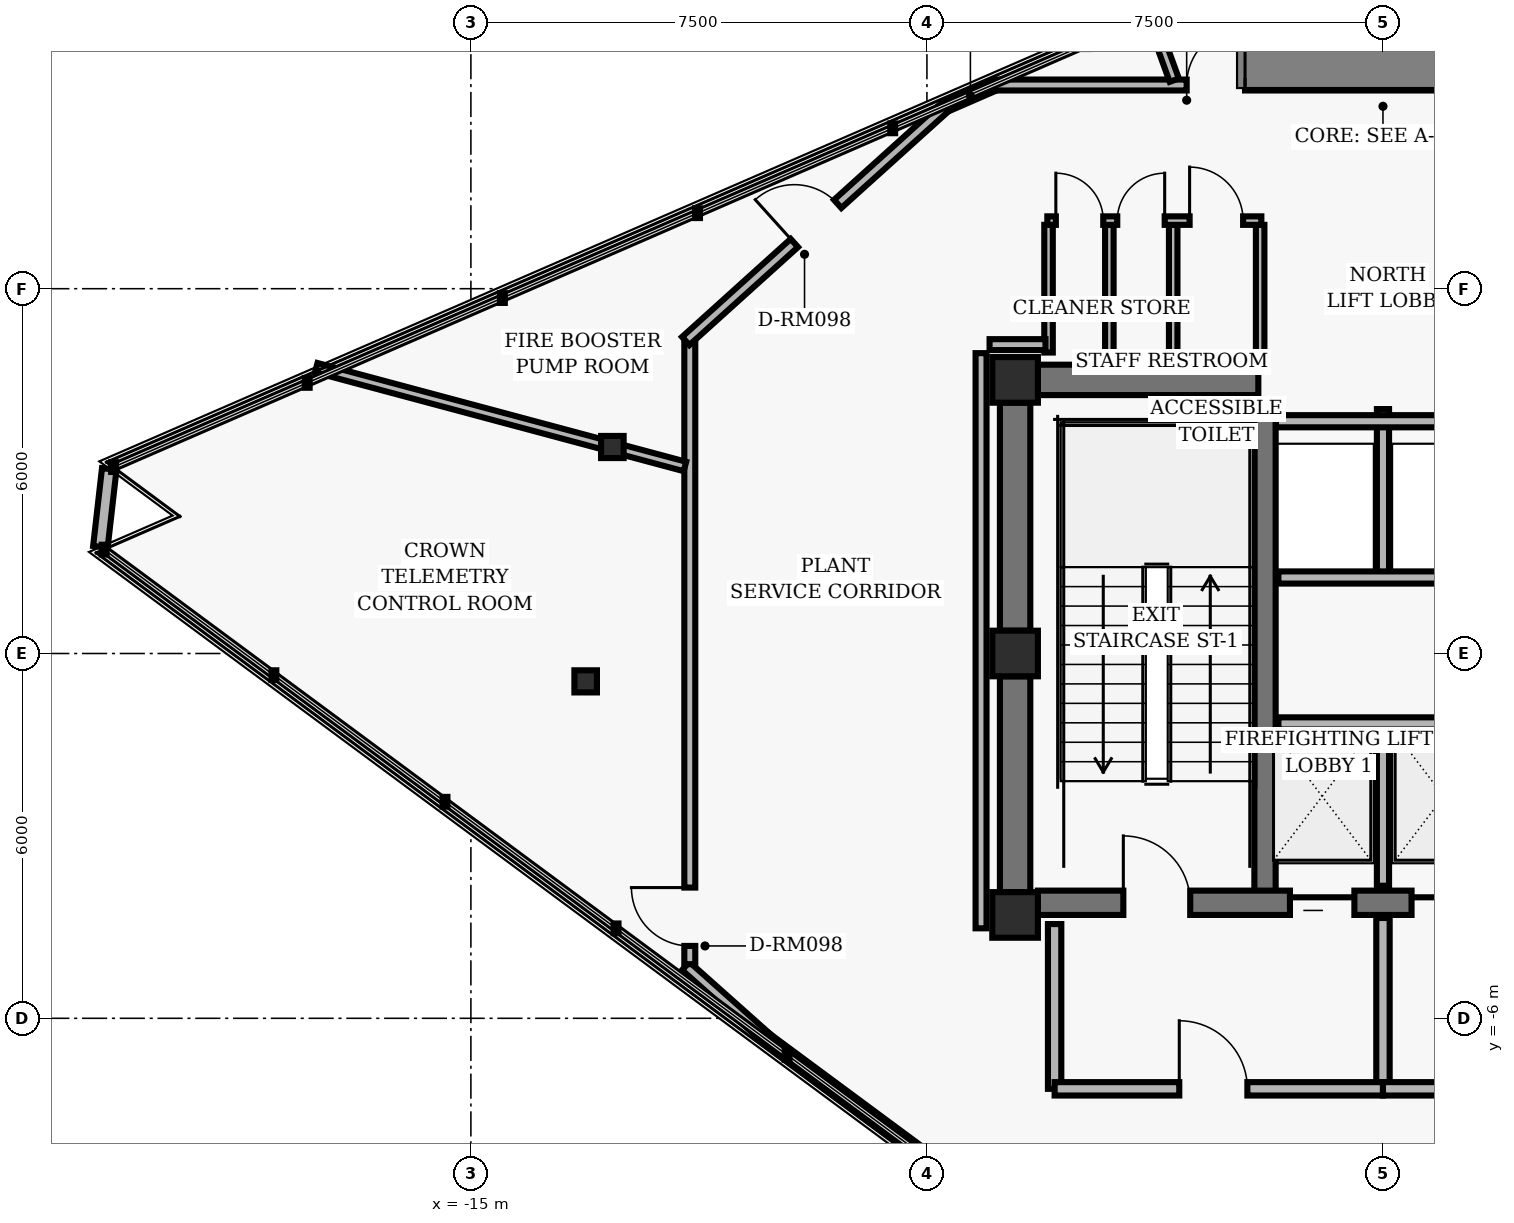
"""IFC4 building model, lengths in metres.
Left out: names, types, materials, properties, quantities, classifications, styles, units other than length and angle.
Written with IfcOpenShell. Run it as: python <this file> out.ifc"""

import sys

from ifc_helpers import new_model, si_unit, direction, frame, frame_2d, origin, origin_2d, place, context, subcontext, project, spatial, rectangle, hollow_rectangle, i_section, extrude, element, fill, save


model = new_model("IFC4")
c1 = context("Model", 3, precision=1e-05, world=origin(), true_north=direction((0.0, 1.0)))
c2 = subcontext(c1, "Body", "Model", "MODEL_VIEW")
j1 = project(units=[si_unit("LENGTHUNIT", "METRE"), si_unit("PLANEANGLEUNIT", "RADIAN")], contexts=[c1])
p1 = place(None, origin())
s1 = spatial("IfcSite", under=j1, at=p1, CompositionType="ELEMENT")
p2 = place(p1, origin())
s2 = spatial("IfcBuilding", under=s1, at=p2, CompositionType="ELEMENT")
p3 = place(p2, frame((0.0, 0.0, 239.2)))
s3 = spatial("IfcBuildingStorey", under=s2, at=p3, CompositionType="ELEMENT", Elevation=239.2)
for number, where, z_axis, x_axis in (
    (1, (-6.05, 4.5, 0.0), (0.0, 0.0, 1.0), (1.0, 0.0, 0.0)),
    (2, (-6.05, 0.0, 0.0), (0.0, 0.0, 1.0), (1.0, 0.0, 0.0)),
    (3, (-6.05, -4.3, 0.0), (0.0, 0.0, 1.0), (1.0, 0.0, 0.0)),
):
    element("IfcColumn", number, at=place(p3, frame(where, z_axis=z_axis, x_axis=x_axis)), inside=s3, PredefinedType="COLUMN", context=c2, shape_type="SweptSolid", body=[
        extrude(hollow_rectangle(XDim=0.75, YDim=0.75, WallThickness=0.05, InnerFilletRadius=0.02, OuterFilletRadius=0.04, at=origin_2d()), origin(), (0.0, 0.0, 1.0), 4.16),
    ])
p4 = place(p3, frame((-6.05, 0.375, 0.0), z_axis=(0.0, 0.0, 1.0), x_axis=(0.0, 1.0, 0.0)))
e4 = element("IfcWall", 4, at=p4, inside=s3, PredefinedType="SHEAR", context=c2, shape_type="SweptSolid", body=[
    extrude(rectangle(XDim=3.75, YDim=0.5, at=frame_2d((1.875, 0.0))), origin(), (0.0, 0.0, 1.0), 3.928),
])
p5 = place(p3, frame((-6.05, -3.925, 0.0), z_axis=(0.0, 0.0, 1.0), x_axis=(0.0, 1.0, 0.0)))
e5 = element("IfcWall", 5, at=p5, inside=s3, PredefinedType="SHEAR", context=c2, shape_type="SweptSolid", body=[
    extrude(rectangle(XDim=3.55, YDim=0.5, at=frame_2d((1.775, 0.0))), origin(), (0.0, 0.0, 1.0), 3.928),
])
p6 = place(p3, frame((-1.94, -4.1, 0.0), z_axis=(0.0, 0.0, 1.0), x_axis=(0.0, 1.0, 0.0)))
e6 = element("IfcWall", 6, at=p6, inside=s3, PredefinedType="SHEAR", context=c2, shape_type="SweptSolid", body=[
    extrude(rectangle(XDim=8.2, YDim=0.35, at=frame_2d((4.1, 0.0))), origin(), (0.0, 0.0, 1.0), 3.928),
])
p7 = place(p3, frame((-5.675, -4.1, 0.0), z_axis=(0.0, 0.0, 1.0), x_axis=(1.0, 0.0, 0.0)))
e7 = element("IfcWall", 7, at=p7, inside=s3, PredefinedType="SHEAR", context=c2, shape_type="SweptSolid", body=[
    extrude(rectangle(XDim=11.35, YDim=0.4, at=frame_2d((5.675, 0.0))), origin(), (0.0, 0.0, 1.0), 3.928),
])
p8 = place(p7, frame((1.405, 0.0, 0.0)))
e8 = element("IfcOpeningElement", 8, at=p8, cuts=e7, PredefinedType="OPENING", context=c2, shape_type="SweptSolid", body=[
    extrude(rectangle(XDim=1.1, YDim=2.04, at=frame_2d((0.55, 1.02))), frame((0.0, 0.21, 0.0), z_axis=(0.0, -1.0, 0.0), x_axis=(1.0, 0.0, 0.0)), (0.0, 0.0, 1.0), 0.42),
])
p9 = place(p7, frame((8.845, 0.0, 0.0)))
e9 = element("IfcOpeningElement", 9, at=p9, cuts=e7, PredefinedType="OPENING", context=c2, shape_type="SweptSolid", body=[
    extrude(rectangle(XDim=1.1, YDim=2.04, at=frame_2d((0.55, 1.02))), frame((0.0, 0.21, 0.0), z_axis=(0.0, -1.0, 0.0), x_axis=(1.0, 0.0, 0.0)), (0.0, 0.0, 1.0), 0.42),
])
p10 = place(p7, frame((4.145, 0.0, 0.0)))
e10 = element("IfcOpeningElement", 10, at=p10, cuts=e7, PredefinedType="OPENING", context=c2, shape_type="SweptSolid", body=[
    extrude(rectangle(XDim=1.06, YDim=2.04, at=frame_2d((0.53, 1.02))), frame((0.0, 0.21, 0.0), z_axis=(0.0, -1.0, 0.0), x_axis=(1.0, 0.0, 0.0)), (0.0, 0.0, 1.0), 0.42),
])
p11 = place(p7, frame((6.145, 0.0, 0.0)))
e11 = element("IfcOpeningElement", 11, at=p11, cuts=e7, PredefinedType="OPENING", context=c2, shape_type="SweptSolid", body=[
    extrude(rectangle(XDim=1.06, YDim=2.04, at=frame_2d((0.53, 1.02))), frame((0.0, 0.21, 0.0), z_axis=(0.0, -1.0, 0.0), x_axis=(1.0, 0.0, 0.0)), (0.0, 0.0, 1.0), 0.42),
])
p12 = place(p3, frame((-5.675, 4.5, 0.0), z_axis=(0.0, 0.0, 1.0), x_axis=(1.0, 0.0, 0.0)))
e12 = element("IfcWall", 12, at=p12, inside=s3, PredefinedType="SHEAR", context=c2, shape_type="SweptSolid", body=[
    extrude(rectangle(XDim=3.625, YDim=0.5, at=frame_2d((1.812, 0.0))), origin(), (0.0, 0.0, 1.0), 3.928),
])
for number, where, z_axis, x_axis in (
    (13, (-12.673, 3.396, 0.0), (0.0, 0.0, 1.0), (1.0, 0.0, 0.0)),
    (14, (-13.113, -0.458, 0.0), (0.0, 0.0, 1.0), (1.0, 0.0, 0.0)),
):
    element("IfcColumn", number, at=place(p3, frame(where, z_axis=z_axis, x_axis=x_axis)), inside=s3, PredefinedType="COLUMN", context=c2, shape_type="SweptSolid", body=[
        extrude(i_section(OverallWidth=0.371, OverallDepth=0.364, WebThickness=0.013, FlangeThickness=0.022, FilletRadius=0.015, at=origin_2d()), origin(), (0.0, 0.0, 1.0), 4.16),
    ])
p13 = place(p3, frame((-20.948, 3.035, 0.0), z_axis=(0.0, 0.0, 1.0), x_axis=(-0.113322117878, -0.993558301057, 0.0)))
e15 = element("IfcWall", 15, at=p13, inside=s3, PredefinedType="PARAPET", context=c2, shape_type="SweptSolid", body=[
    extrude(rectangle(XDim=1.288, YDim=0.24, at=frame_2d((0.644, 0.0))), origin(), (0.0, 0.0, 1.0), 3.448),
])
p14 = place(p3, frame((0.0, -3.82, 0.0), z_axis=(0.0, 0.0, 1.0), x_axis=(0.0, 1.0, 0.0)))
e16 = element("IfcWall", 16, at=p14, inside=s3, PredefinedType="PARTITIONING", context=c2, shape_type="SweptSolid", body=[
    extrude(rectangle(XDim=2.67, YDim=0.2, at=frame_2d((1.335, 0.0))), origin(), (0.0, 0.0, 1.0), 3.903),
])
p15 = place(p3, frame((-1.72, -1.15, 0.0), z_axis=(0.0, 0.0, 1.0), x_axis=(1.0, 0.0, 0.0)))
e17 = element("IfcWall", 17, at=p15, inside=s3, PredefinedType="PARTITIONING", context=c2, shape_type="SweptSolid", body=[
    extrude(rectangle(XDim=3.44, YDim=0.2, at=frame_2d((1.72, 0.0))), origin(), (0.0, 0.0, 1.0), 3.903),
])
p16 = place(p3, frame((-5.4, -7.16, 0.0), z_axis=(0.0, 0.0, 1.0), x_axis=(0.0, 1.0, 0.0)))
e18 = element("IfcWall", 18, at=p16, inside=s3, PredefinedType="PARTITIONING", context=c2, shape_type="SweptSolid", body=[
    extrude(rectangle(XDim=2.71, YDim=0.22, at=frame_2d((1.355, 0.0))), origin(), (0.0, 0.0, 1.0), 3.903),
])
p17 = place(p3, frame((0.0, -7.16, 0.0), z_axis=(0.0, 0.0, 1.0), x_axis=(0.0, 1.0, 0.0)))
e19 = element("IfcWall", 19, at=p17, inside=s3, PredefinedType="PARTITIONING", context=c2, shape_type="SweptSolid", body=[
    extrude(rectangle(XDim=2.81, YDim=0.22, at=frame_2d((1.405, 0.0))), origin(), (0.0, 0.0, 1.0), 3.903),
])
p18 = place(p3, frame((-5.4, -7.16, 0.0), z_axis=(0.0, 0.0, 1.0), x_axis=(1.0, 0.0, 0.0)))
e20 = element("IfcWall", 20, at=p18, inside=s3, PredefinedType="PARTITIONING", context=c2, shape_type="SweptSolid", body=[
    extrude(rectangle(XDim=5.4, YDim=0.22, at=frame_2d((2.7, 0.0))), origin(), (0.0, 0.0, 1.0), 3.903),
])
p19 = place(p18, frame((2.05, 0.0, 0.0)))
e21 = element("IfcOpeningElement", 21, at=p19, cuts=e20, PredefinedType="OPENING", context=c2, shape_type="SweptSolid", body=[
    extrude(rectangle(XDim=1.12, YDim=2.02, at=frame_2d((0.56, 1.01))), frame((0.0, 0.12, 0.0), z_axis=(0.0, -1.0, 0.0), x_axis=(1.0, 0.0, 0.0)), (0.0, 0.0, 1.0), 0.24),
])
p20 = place(p3, frame((0.0, -7.16, 0.0), z_axis=(0.0, 0.0, 1.0), x_axis=(1.0, 0.0, 0.0)))
e22 = element("IfcWall", 22, at=p20, inside=s3, PredefinedType="PARTITIONING", context=c2, shape_type="SweptSolid", body=[
    extrude(rectangle(XDim=5.4, YDim=0.22, at=frame_2d((2.7, 0.0))), origin(), (0.0, 0.0, 1.0), 3.903),
])
p21 = place(p20, frame((2.05, 0.0, 0.0)))
e23 = element("IfcOpeningElement", 23, at=p21, cuts=e22, PredefinedType="OPENING", context=c2, shape_type="SweptSolid", body=[
    extrude(rectangle(XDim=1.12, YDim=2.02, at=frame_2d((0.56, 1.01))), frame((0.0, 0.12, 0.0), z_axis=(0.0, -1.0, 0.0), x_axis=(1.0, 0.0, 0.0)), (0.0, 0.0, 1.0), 0.24),
])
p22 = place(p3, frame((0.0, 1.25, 0.0), z_axis=(0.0, 0.0, 1.0), x_axis=(0.0, 1.0, 0.0)))
e24 = element("IfcWall", 24, at=p22, inside=s3, PredefinedType="PARTITIONING", context=c2, shape_type="SweptSolid", body=[
    extrude(rectangle(XDim=2.77, YDim=0.2, at=frame_2d((1.385, 0.0))), origin(), (0.0, 0.0, 1.0), 3.903),
])
p23 = place(p3, frame((-1.72, 1.25, 0.0), z_axis=(0.0, 0.0, 1.0), x_axis=(1.0, 0.0, 0.0)))
e25 = element("IfcWall", 25, at=p23, inside=s3, PredefinedType="PARTITIONING", context=c2, shape_type="SweptSolid", body=[
    extrude(rectangle(XDim=3.44, YDim=0.2, at=frame_2d((1.72, 0.0))), origin(), (0.0, 0.0, 1.0), 3.903),
])
p24 = place(p3, frame((-1.76, 3.82, 0.0), z_axis=(0.0, 0.0, 1.0), x_axis=(1.0, 0.0, 0.0)))
e26 = element("IfcWall", 26, at=p24, inside=s3, PredefinedType="PARTITIONING", context=c2, shape_type="SweptSolid", body=[
    extrude(rectangle(XDim=3.52, YDim=0.2, at=frame_2d((1.76, 0.0))), origin(), (0.0, 0.0, 1.0), 3.903),
])
for number, where, z_axis, x_axis in (
    (27, (-5.5, 4.95, 0.0), (0.0, 0.0, 1.0), (0.0, 1.0, 0.0)),
    (28, (-4.5, 4.95, 0.0), (0.0, 0.0, 1.0), (0.0, 1.0, 0.0)),
    (29, (-3.45, 4.95, 0.0), (0.0, 0.0, 1.0), (0.0, 1.0, 0.0)),
    (30, (-2.02, 4.95, 0.0), (0.0, 0.0, 1.0), (0.0, 1.0, 0.0)),
):
    element("IfcWall", number, at=place(p3, frame(where, z_axis=z_axis, x_axis=x_axis)), inside=s3, PredefinedType="PARTITIONING", context=c2, shape_type="SweptSolid", body=[
        extrude(rectangle(XDim=2.1, YDim=0.14, at=frame_2d((1.05, 0.0))), origin(), (0.0, 0.0, 1.0), 3.903),
    ])
p25 = place(p3, frame((-5.52, 7.12, 0.0), z_axis=(0.0, 0.0, 1.0), x_axis=(1.0, 0.0, 0.0)))
e31 = element("IfcWall", 31, at=p25, inside=s3, PredefinedType="PARTITIONING", context=c2, shape_type="SweptSolid", body=[
    extrude(rectangle(XDim=3.52, YDim=0.14, at=frame_2d((1.76, 0.0))), origin(), (0.0, 0.0, 1.0), 3.903),
])
p26 = place(p25, frame((0.14, 0.0, 0.0)))
e32 = element("IfcOpeningElement", 32, at=p26, cuts=e31, PredefinedType="OPENING", context=c2, shape_type="SweptSolid", body=[
    extrude(rectangle(XDim=0.78, YDim=2.01, at=frame_2d((0.39, 1.005))), frame((0.0, 0.08, 0.0), z_axis=(0.0, -1.0, 0.0), x_axis=(1.0, 0.0, 0.0)), (0.0, 0.0, 1.0), 0.16),
])
p27 = place(p25, frame((1.15, 0.0, 0.0)))
e33 = element("IfcOpeningElement", 33, at=p27, cuts=e31, PredefinedType="OPENING", context=c2, shape_type="SweptSolid", body=[
    extrude(rectangle(XDim=0.78, YDim=2.01, at=frame_2d((0.39, 1.005))), frame((0.0, 0.08, 0.0), z_axis=(0.0, -1.0, 0.0), x_axis=(1.0, 0.0, 0.0)), (0.0, 0.0, 1.0), 0.16),
])
p28 = place(p25, frame((2.34, 0.0, 0.0)))
e34 = element("IfcOpeningElement", 34, at=p28, cuts=e31, PredefinedType="OPENING", context=c2, shape_type="SweptSolid", body=[
    extrude(rectangle(XDim=0.88, YDim=2.02, at=frame_2d((0.44, 1.01))), frame((0.0, 0.08, 0.0), z_axis=(0.0, -1.0, 0.0), x_axis=(1.0, 0.0, 0.0)), (0.0, 0.0, 1.0), 0.16),
])
p29 = place(p3, frame((-7.215, 8.984, 0.0), z_axis=(0.0, 0.0, 1.0), x_axis=(0.91702860971, 0.398821424917, 0.0)))
e35 = element("IfcWall", 35, at=p29, inside=s3, PredefinedType="PARTITIONING", context=c2, shape_type="SweptSolid", body=[
    extrude(rectangle(XDim=0.937, YDim=0.18, at=frame_2d((0.468, 0.0))), origin(), (0.0, 0.0, 1.0), 3.903),
])
p30 = place(p3, frame((-6.394, 9.35, 0.0), z_axis=(0.0, 0.0, 1.0), x_axis=(1.0, 0.0, 0.0)))
e36 = element("IfcWall", 36, at=p30, inside=s3, PredefinedType="PARTITIONING", context=c2, shape_type="SweptSolid", body=[
    extrude(rectangle(XDim=13.284, YDim=0.18, at=frame_2d((6.642, 0.0))), origin(), (0.0, 0.0, 1.0), 3.903),
])
p31 = place(p30, frame((3.166, 0.0, 0.0)))
e37 = element("IfcOpeningElement", 37, at=p31, cuts=e36, PredefinedType="OPENING", context=c2, shape_type="SweptSolid", body=[
    extrude(rectangle(XDim=0.96, YDim=2.02, at=frame_2d((0.48, 1.01))), frame((0.0, 0.1, 0.0), z_axis=(0.0, -1.0, 0.0), x_axis=(1.0, 0.0, 0.0)), (0.0, 0.0, 1.0), 0.2),
])
p32 = place(p3, frame((-6.192, -9.247, 0.0), z_axis=(0.0, 0.0, 1.0), x_axis=(-0.803841424004, 0.594843647571, 0.0)))
e38 = element("IfcWall", 38, at=p32, inside=s3, PredefinedType="PARTITIONING", context=c2, shape_type="SweptSolid", body=[
    extrude(rectangle(XDim=4.913, YDim=0.18, at=frame_2d((2.457, 0.0))), origin(), (0.0, 0.0, 1.0), 3.903),
])
p33 = place(p3, frame((-10.111, -6.349, 0.0), z_axis=(0.0, 0.0, 1.0), x_axis=(-0.746578549697, 0.665297278765, 0.0)))
e39 = element("IfcWall", 39, at=p33, inside=s3, PredefinedType="PARTITIONING", context=c2, shape_type="SweptSolid", body=[
    extrude(rectangle(XDim=1.817, YDim=0.18, at=frame_2d((0.909, 0.0))), origin(), (0.0, 0.0, 1.0), 3.903),
])
p34 = place(p3, frame((-11.4, -5.11, 0.0), z_axis=(0.0, 0.0, 1.0), x_axis=(0.0, 1.0, 0.0)))
e40 = element("IfcWall", 40, at=p34, inside=s3, PredefinedType="PARTITIONING", context=c2, shape_type="SweptSolid", body=[
    extrude(rectangle(XDim=10.22, YDim=0.18, at=frame_2d((5.11, 0.0))), origin(), (0.0, 0.0, 1.0), 3.903),
])
p35 = place(p34, frame((0.3, 0.0, 0.0)))
e41 = element("IfcOpeningElement", 41, at=p35, cuts=e40, PredefinedType="OPENING", context=c2, shape_type="SweptSolid", body=[
    extrude(rectangle(XDim=0.96, YDim=2.02, at=frame_2d((0.48, 1.01))), frame((0.0, 0.1, 0.0), z_axis=(0.0, -1.0, 0.0), x_axis=(1.0, 0.0, 0.0)), (0.0, 0.0, 1.0), 0.2),
])
p36 = place(p3, frame((-11.467, 5.14, 0.0), z_axis=(0.0, 0.0, 1.0), x_axis=(0.742488041898, 0.66985931929, 0.0)))
e42 = element("IfcWall", 42, at=p36, inside=s3, PredefinedType="PARTITIONING", context=c2, shape_type="SweptSolid", body=[
    extrude(rectangle(XDim=5.772, YDim=0.18, at=frame_2d((2.886, 0.0))), origin(), (0.0, 0.0, 1.0), 3.903),
])
p37 = place(p36, frame((2.406, 0.0, 0.0)))
e43 = element("IfcOpeningElement", 43, at=p37, cuts=e42, PredefinedType="OPENING", context=c2, shape_type="SweptSolid", body=[
    extrude(rectangle(XDim=0.96, YDim=2.02, at=frame_2d((0.48, 1.01))), frame((0.0, 0.1, 0.0), z_axis=(0.0, -1.0, 0.0), x_axis=(1.0, 0.0, 0.0)), (0.0, 0.0, 1.0), 0.2),
])
p38 = place(p3, frame((-6.61, 4.94, 0.0), z_axis=(0.0, 0.0, 1.0), x_axis=(0.0, -1.0, 0.0)))
e44 = element("IfcWall", 44, at=p38, inside=s3, PredefinedType="PARTITIONING", context=c2, shape_type="SweptSolid", body=[
    extrude(rectangle(XDim=9.46, YDim=0.18, at=frame_2d((4.73, 0.0))), origin(), (0.0, 0.0, 1.0), 3.903),
])
p39 = place(p3, frame((-5.55, 5.08, 0.0), z_axis=(0.0, 0.0, 1.0), x_axis=(-1.0, 0.0, 0.0)))
e45 = element("IfcWall", 45, at=p39, inside=s3, PredefinedType="PARTITIONING", context=c2, shape_type="SweptSolid", body=[
    extrude(rectangle(XDim=0.92, YDim=0.18, at=frame_2d((0.46, 0.0))), origin(), (0.0, 0.0, 1.0), 3.903),
])
p40 = place(p3, frame((-3.432, 9.43, 0.0), z_axis=(0.0, 0.0, 1.0), x_axis=(-0.342016142969, 0.939694076787, 0.0)))
e46 = element("IfcWall", 46, at=p40, inside=s3, PredefinedType="PARTITIONING", context=c2, shape_type="SweptSolid", body=[
    extrude(rectangle(XDim=1.292, YDim=0.16, at=frame_2d((0.646, 0.0))), origin(), (0.0, 0.0, 1.0), 3.903),
])
p41 = place(p3, frame((-11.48, 3.076, 0.0), z_axis=(0.0, 0.0, 1.0), x_axis=(-0.965930864757, 0.258800240551, 0.0)))
e47 = element("IfcWall", 47, at=p41, inside=s3, PredefinedType="PARTITIONING", context=c2, shape_type="SweptSolid", body=[
    extrude(rectangle(XDim=6.277, YDim=0.16, at=frame_2d((3.139, 0.0))), origin(), (0.0, 0.0, 1.0), 3.903),
])
p42 = place(p8, origin())
e48 = element("IfcDoor", 48, at=p42, inside=s3, OperationType="SINGLE_SWING_LEFT", PredefinedType="DOOR", context=c2, shape_type="SweptSolid", body=[
    extrude(rectangle(XDim=1.1, YDim=2.04, at=frame_2d((0.55, 1.02))), frame((0.0, 0.025, 0.0), z_axis=(0.0, -1.0, 0.0), x_axis=(1.0, 0.0, 0.0)), (0.0, 0.0, 1.0), 0.05),
])
fill(e8, e48)
p43 = place(p10, origin())
e49 = element("IfcDoor", 49, at=p43, inside=s3, OperationType="SLIDING_TO_LEFT", PredefinedType="DOOR", context=c2, shape_type="SweptSolid", body=[
    extrude(rectangle(XDim=1.06, YDim=2.04, at=frame_2d((0.53, 1.02))), frame((0.0, 0.025, 0.0), z_axis=(0.0, -1.0, 0.0), x_axis=(1.0, 0.0, 0.0)), (0.0, 0.0, 1.0), 0.05),
])
fill(e10, e49)
p44 = place(p11, origin())
e50 = element("IfcDoor", 50, at=p44, inside=s3, OperationType="SLIDING_TO_RIGHT", PredefinedType="DOOR", context=c2, shape_type="SweptSolid", body=[
    extrude(rectangle(XDim=1.06, YDim=2.04, at=frame_2d((0.53, 1.02))), frame((0.0, 0.025, 0.0), z_axis=(0.0, -1.0, 0.0), x_axis=(1.0, 0.0, 0.0)), (0.0, 0.0, 1.0), 0.05),
])
fill(e11, e50)
p45 = place(p19, origin())
e51 = element("IfcDoor", 51, at=p45, inside=s3, OperationType="SINGLE_SWING_LEFT", PredefinedType="DOOR", context=c2, shape_type="SweptSolid", body=[
    extrude(rectangle(XDim=1.12, YDim=2.02, at=frame_2d((0.56, 1.01))), frame((0.0, 0.025, 0.0), z_axis=(0.0, -1.0, 0.0), x_axis=(1.0, 0.0, 0.0)), (0.0, 0.0, 1.0), 0.05),
])
fill(e21, e51)
p46 = place(p26, origin())
e52 = element("IfcDoor", 52, at=p46, inside=s3, OperationType="SINGLE_SWING_LEFT", PredefinedType="DOOR", context=c2, shape_type="SweptSolid", body=[
    extrude(rectangle(XDim=0.78, YDim=2.01, at=frame_2d((0.39, 1.005))), frame((0.0, 0.025, 0.0), z_axis=(0.0, -1.0, 0.0), x_axis=(1.0, 0.0, 0.0)), (0.0, 0.0, 1.0), 0.05),
])
fill(e32, e52)
p47 = place(p27, origin())
e53 = element("IfcDoor", 53, at=p47, inside=s3, OperationType="SINGLE_SWING_RIGHT", PredefinedType="DOOR", context=c2, shape_type="SweptSolid", body=[
    extrude(rectangle(XDim=0.78, YDim=2.01, at=frame_2d((0.39, 1.005))), frame((0.0, 0.025, 0.0), z_axis=(0.0, -1.0, 0.0), x_axis=(1.0, 0.0, 0.0)), (0.0, 0.0, 1.0), 0.05),
])
fill(e33, e53)
p48 = place(p28, origin())
e54 = element("IfcDoor", 54, at=p48, inside=s3, OperationType="SINGLE_SWING_LEFT", PredefinedType="DOOR", context=c2, shape_type="SweptSolid", body=[
    extrude(rectangle(XDim=0.88, YDim=2.02, at=frame_2d((0.44, 1.01))), frame((0.0, 0.025, 0.0), z_axis=(0.0, -1.0, 0.0), x_axis=(1.0, 0.0, 0.0)), (0.0, 0.0, 1.0), 0.05),
])
fill(e34, e54)
p49 = place(p31, origin())
e55 = element("IfcDoor", 55, at=p49, inside=s3, OperationType="SINGLE_SWING_RIGHT", PredefinedType="DOOR", context=c2, shape_type="SweptSolid", body=[
    extrude(rectangle(XDim=0.96, YDim=2.02, at=frame_2d((0.48, 1.01))), frame((0.0, 0.025, 0.0), z_axis=(0.0, -1.0, 0.0), x_axis=(1.0, 0.0, 0.0)), (0.0, 0.0, 1.0), 0.05),
])
fill(e37, e55)
p50 = place(p37, origin())
e56 = element("IfcDoor", 56, at=p50, inside=s3, OperationType="SINGLE_SWING_LEFT", PredefinedType="DOOR", context=c2, shape_type="SweptSolid", body=[
    extrude(rectangle(XDim=0.96, YDim=2.02, at=frame_2d((0.48, 1.01))), frame((0.0, 0.025, 0.0), z_axis=(0.0, -1.0, 0.0), x_axis=(1.0, 0.0, 0.0)), (0.0, 0.0, 1.0), 0.05),
])
fill(e43, e56)
p51 = place(p35, origin())
e57 = element("IfcDoor", 57, at=p51, inside=s3, OperationType="SINGLE_SWING_RIGHT", PredefinedType="DOOR", context=c2, shape_type="SweptSolid", body=[
    extrude(rectangle(XDim=0.96, YDim=2.02, at=frame_2d((0.48, 1.01))), frame((0.0, 0.025, 0.0), z_axis=(0.0, -1.0, 0.0), x_axis=(1.0, 0.0, 0.0)), (0.0, 0.0, 1.0), 0.05),
])
fill(e41, e57)
save(model, sys.argv[1])
